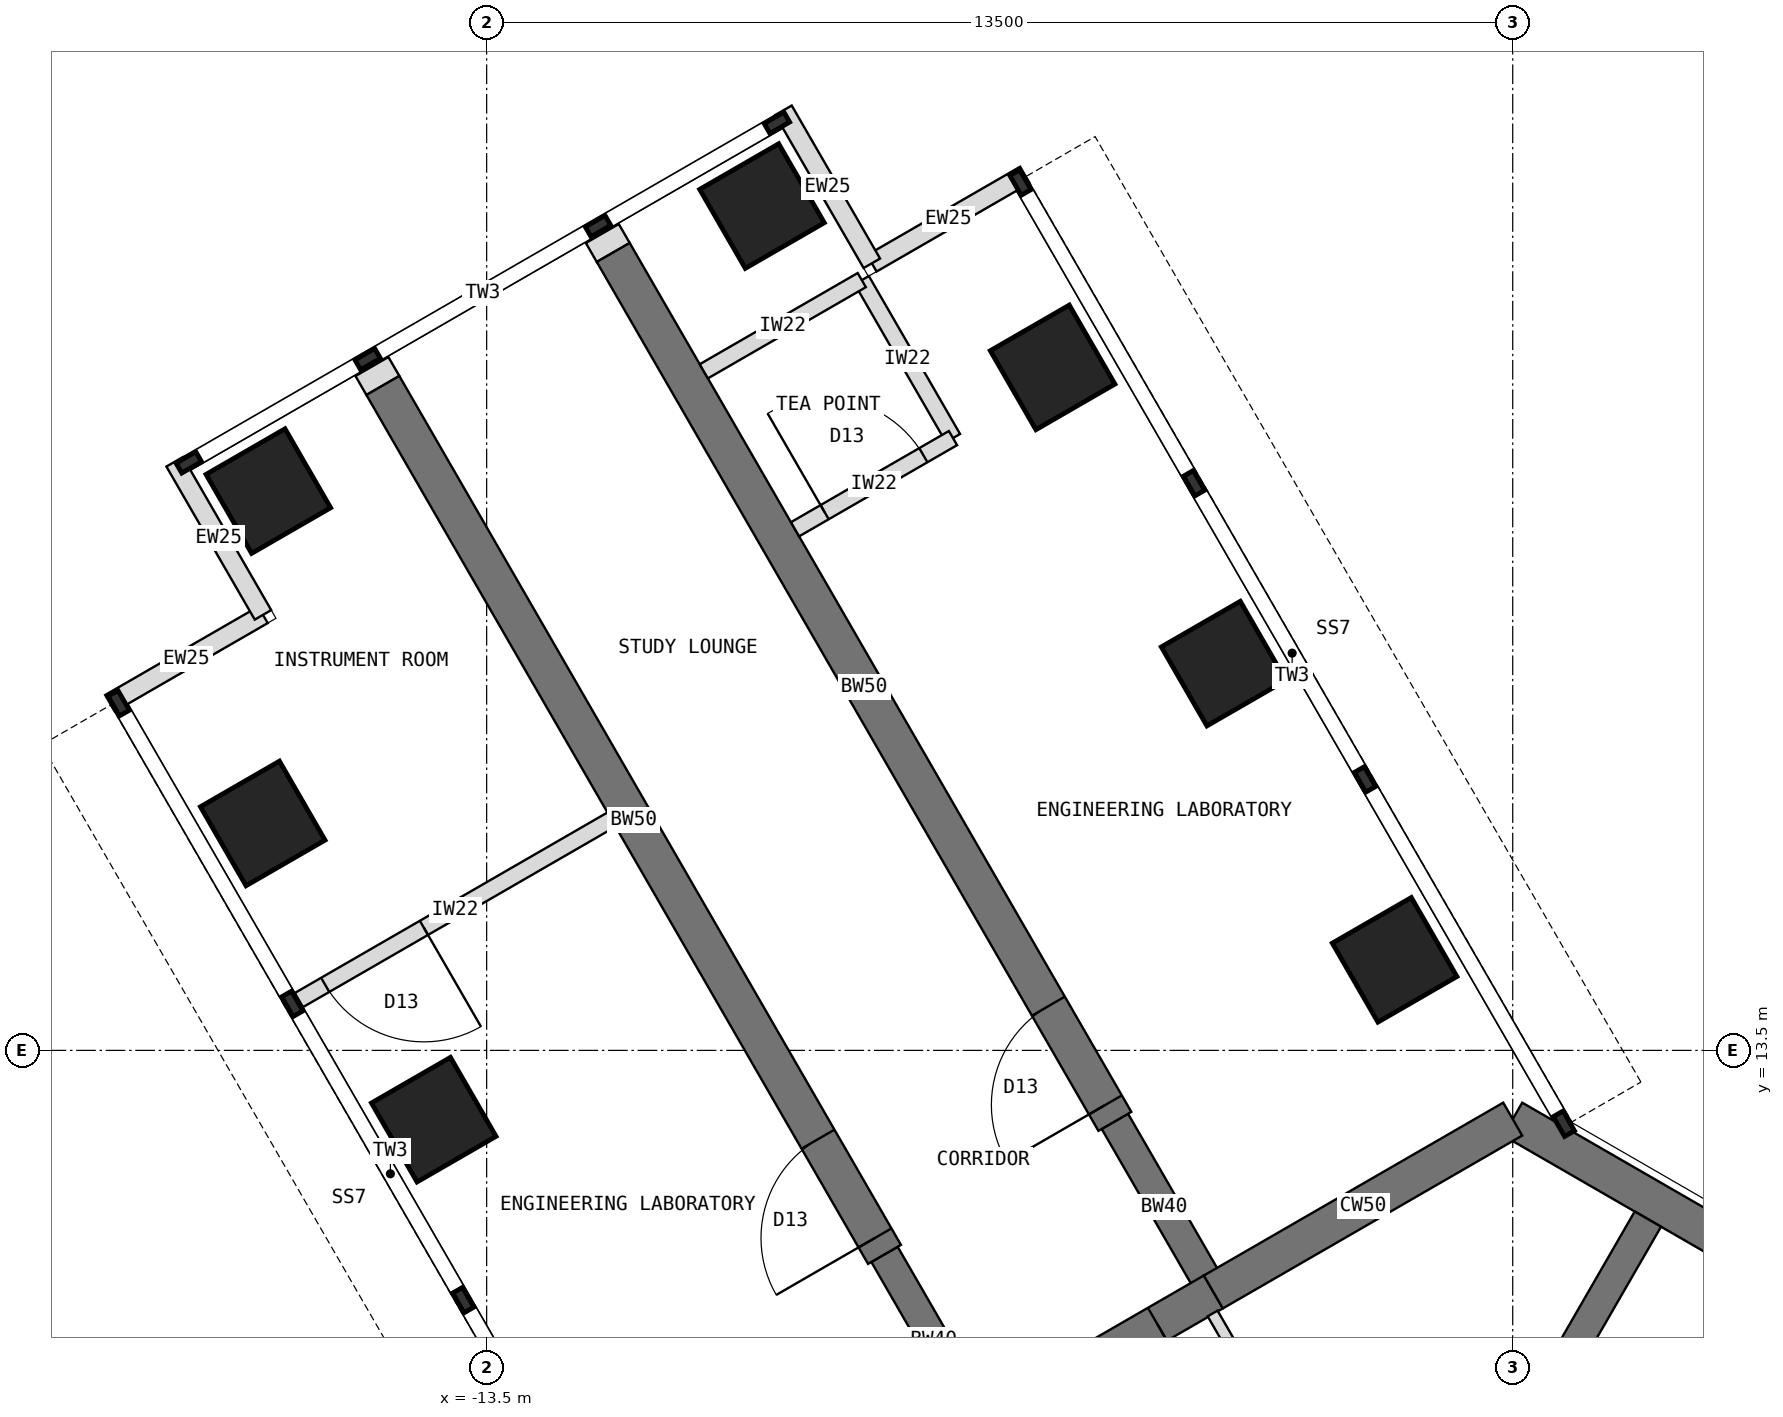
"""IFC4 building model, lengths in metres.
Left out: names, types, materials, properties, quantities, classifications, styles, units other than length and angle.
Written with IfcOpenShell. Run it as: python <this file> out.ifc"""

import sys

from ifc_helpers import new_model, si_unit, direction, frame, frame_2d, origin, origin_2d, place, context, subcontext, project, spatial, rectangle, extrude, element, fill, save


model = new_model("IFC4")
c1 = context("Model", 3, precision=1e-05, world=origin(), true_north=direction((0.0, 1.0)))
c2 = subcontext(c1, "Body", "Model", "MODEL_VIEW")
j1 = project(units=[si_unit("LENGTHUNIT", "METRE"), si_unit("PLANEANGLEUNIT", "RADIAN")], contexts=[c1])
p1 = place(None, origin())
s1 = spatial("IfcSite", under=j1, at=p1, CompositionType="ELEMENT")
p2 = place(p1, origin())
s2 = spatial("IfcBuilding", under=s1, at=p2, CompositionType="ELEMENT")
p3 = place(p2, frame((0.0, 0.0, 174.5)))
s3 = spatial("IfcBuildingStorey", under=s2, at=p3, CompositionType="ELEMENT", Elevation=174.5)
p4 = place(p3, frame((10.908, 6.298, 0.0), z_axis=(0.0, 0.0, 1.0), x_axis=(-0.866021940709, 0.500005998175, 0.0)))
e1 = element("IfcWall", 1, at=p4, inside=s3, PredefinedType="SHEAR", context=c2, shape_type="SweptSolid", body=[
    extrude(rectangle(XDim=12.596, YDim=0.5, at=frame_2d((6.298, 0.0))), origin(), (0.0, 0.0, 1.0), 4.0),
])
p5 = place(p3, frame((0.0, 12.596, 0.0), z_axis=(0.0, 0.0, 1.0), x_axis=(-0.866011268655, -0.500024481964, 0.0)))
e2 = element("IfcWall", 2, at=p5, inside=s3, PredefinedType="SHEAR", context=c2, shape_type="SweptSolid", body=[
    extrude(rectangle(XDim=4.548, YDim=0.5, at=frame_2d((2.274, 0.0))), origin(), (0.0, 0.0, 1.0), 4.0),
])
p6 = place(p3, frame((-3.939, 10.322, 0.0), z_axis=(0.0, 0.0, 1.0), x_axis=(-0.866019471182, -0.500010275428, 0.0)))
e3 = element("IfcWall", 3, at=p6, inside=s3, PredefinedType="SHEAR", context=c2, shape_type="SweptSolid", body=[
    extrude(rectangle(XDim=3.5, YDim=0.5, at=frame_2d((1.75, 0.0))), origin(), (0.0, 0.0, 1.0), 4.0),
])
p7 = place(p6, frame((0.85, 0.0, 0.0)))
e4 = element("IfcOpeningElement", 4, at=p7, cuts=e3, PredefinedType="OPENING", context=c2, shape_type="SweptSolid", body=[
    extrude(rectangle(XDim=1.8, YDim=2.1, at=frame_2d((0.9, 1.05))), frame((0.0, 0.26, 0.0), z_axis=(0.0, -1.0, 0.0), x_axis=(1.0, 0.0, 0.0)), (0.0, 0.0, 1.0), 0.52),
])
p8 = place(p3, frame((-6.97, 8.572, 0.0), z_axis=(0.0, 0.0, 1.0), x_axis=(-0.499988811324, 0.866031863473, 0.0)))
e5 = element("IfcWall", 5, at=p8, inside=s3, PredefinedType="SHEAR", context=c2, shape_type="SweptSolid", body=[
    extrude(rectangle(XDim=2.592, YDim=0.4, at=frame_2d((1.296, 0.0))), origin(), (0.0, 0.0, 1.0), 4.0),
])
p9 = place(p3, frame((-8.266, 10.816, 0.0), z_axis=(0.0, 0.0, 1.0), x_axis=(-0.499996231654, 0.866027579429, 0.0)))
e6 = element("IfcWall", 6, at=p9, inside=s3, PredefinedType="SHEAR", context=c2, shape_type="SweptSolid", body=[
    extrude(rectangle(XDim=13.2, YDim=0.5, at=frame_2d((6.6, 0.0))), origin(), (0.0, 0.0, 1.0), 4.0),
])
p10 = place(p9, frame((0.25, 0.0, 0.0)))
e7 = element("IfcOpeningElement", 7, at=p10, cuts=e6, PredefinedType="OPENING", context=c2, shape_type="SweptSolid", body=[
    extrude(rectangle(XDim=1.5, YDim=2.1, at=frame_2d((0.75, 1.05))), frame((0.0, 0.26, 0.0), z_axis=(0.0, -1.0, 0.0), x_axis=(1.0, 0.0, 0.0)), (0.0, 0.0, 1.0), 0.52),
])
p11 = place(p3, frame((-3.939, 10.322, 0.0), z_axis=(0.0, 0.0, 1.0), x_axis=(-0.499918158782, 0.866072649678, 0.0)))
e8 = element("IfcWall", 8, at=p11, inside=s3, PredefinedType="SHEAR", context=c2, shape_type="SweptSolid", body=[
    extrude(rectangle(XDim=2.592, YDim=0.4, at=frame_2d((1.296, 0.0))), origin(), (0.0, 0.0, 1.0), 4.0),
])
p12 = place(p3, frame((-5.234, 12.566, 0.0), z_axis=(0.0, 0.0, 1.0), x_axis=(-0.500010103361, 0.866019570528, 0.0)))
e9 = element("IfcWall", 9, at=p12, inside=s3, PredefinedType="SHEAR", context=c2, shape_type="SweptSolid", body=[
    extrude(rectangle(XDim=13.2, YDim=0.5, at=frame_2d((6.6, 0.0))), origin(), (0.0, 0.0, 1.0), 4.0),
])
p13 = place(p12, frame((0.25, 0.0, 0.0)))
e10 = element("IfcOpeningElement", 10, at=p13, cuts=e9, PredefinedType="OPENING", context=c2, shape_type="SweptSolid", body=[
    extrude(rectangle(XDim=1.5, YDim=2.1, at=frame_2d((0.75, 1.05))), frame((0.0, 0.26, 0.0), z_axis=(0.0, -1.0, 0.0), x_axis=(1.0, 0.0, 0.0)), (0.0, 0.0, 1.0), 0.52),
])
for number, where, z_axis, x_axis in (
    (11, (-1.554, 14.691, 0.0), (0.0, 0.0, 1.0), (0.866, 0.5, 0.0)),
    (12, (-14.196, 12.588, 0.0), (0.0, 0.0, 1.0), (0.866, 0.5, 0.0)),
    (13, (-3.804, 18.588, 0.0), (0.0, 0.0, 1.0), (0.866, 0.5, 0.0)),
    (14, (-16.446, 16.486, 0.0), (0.0, 0.0, 1.0), (0.866, 0.5, 0.0)),
    (15, (-6.054, 22.486, 0.0), (0.0, 0.0, 1.0), (0.866, 0.5, 0.0)),
    (16, (-16.373, 20.858, 0.0), (0.0, 0.0, 1.0), (0.866, 0.5, 0.0)),
    (17, (-9.877, 24.608, 0.0), (0.0, 0.0, 1.0), (0.866, 0.5, 0.0)),
):
    element("IfcColumn", number, at=place(p3, frame(where, z_axis=z_axis, x_axis=x_axis)), inside=s3, PredefinedType="COLUMN", context=c2, shape_type="SweptSolid", body=[
        extrude(rectangle(XDim=1.2, YDim=1.2, at=origin_2d()), origin(), (0.0, 0.0, 1.0), 4.0),
    ])
for number, where, z_axis, x_axis in (
    (18, (-18.456, 18.067, 0.0), (0.0, 0.0, 1.0), (0.866, 0.5, 0.0)),
    (19, (-16.443, 19.23, 0.0), (0.0, 0.0, 1.0), (-0.5, 0.866, 0.0)),
    (20, (-6.419, 25.017, 0.0), (0.0, 0.0, 1.0), (-0.866, -0.5, 0.0)),
    (21, (-8.432, 23.855, 0.0), (0.0, 0.0, 1.0), (-0.5, 0.866, 0.0)),
):
    element("IfcWall", number, at=place(p3, frame(where, z_axis=z_axis, x_axis=x_axis)), inside=s3, PredefinedType="STANDARD", context=c2, shape_type="SweptSolid", body=[
        extrude(rectangle(XDim=2.325, YDim=0.25, at=frame_2d((1.163, 0.0))), origin(), (0.0, 0.0, 1.0), 3.8),
    ])
for number, where, z_axis, x_axis in (
    (22, (-14.865, 22.248, 0.0), (0.0, 0.0, 1.0), (-0.5, 0.866, 0.0)),
    (23, (-11.834, 23.998, 0.0), (0.0, 0.0, 1.0), (-0.5, 0.866, 0.0)),
):
    element("IfcWall", number, at=place(p3, frame(where, z_axis=z_axis, x_axis=x_axis)), inside=s3, PredefinedType="PARTITIONING", context=c2, shape_type="SweptSolid", body=[
        extrude(rectangle(XDim=0.288, YDim=0.5, at=frame_2d((0.144, 0.0))), origin(), (0.0, 0.0, 1.0), 3.8),
    ])
p14 = place(p3, frame((-1.201, 6.12, 0.0), z_axis=(0.0, 0.0, 1.0), x_axis=(0.500021575205, 0.866012946976, 0.0)))
e24 = element("IfcWall", 24, at=p14, inside=s3, PredefinedType="SHEAR", context=c2, shape_type="SweptSolid", body=[
    extrude(rectangle(XDim=5.958, YDim=0.4, at=frame_2d((2.979, 0.0))), origin(), (0.0, 0.0, 1.0), 4.0),
])
p15 = place(p3, frame((-11.857, 16.537, 0.0), z_axis=(0.0, 0.0, 1.0), x_axis=(-0.866033238375, -0.499986429846, 0.0)))
e25 = element("IfcWall", 25, at=p15, inside=s3, PredefinedType="PARTITIONING", context=c2, shape_type="SweptSolid", body=[
    extrude(rectangle(XDim=4.75, YDim=0.215, at=frame_2d((2.375, 0.0))), origin(), (0.0, 0.0, 1.0), 3.8),
])
p16 = place(p15, frame((2.85, 0.0, 0.0)))
e26 = element("IfcOpeningElement", 26, at=p16, cuts=e25, PredefinedType="OPENING", context=c2, shape_type="SweptSolid", body=[
    extrude(rectangle(XDim=1.5, YDim=2.1, at=frame_2d((0.75, 1.05))), frame((0.0, 0.117, 0.0), z_axis=(0.0, -1.0, 0.0), x_axis=(1.0, 0.0, 0.0)), (0.0, 0.0, 1.0), 0.235),
])
p17 = place(p3, frame((-7.365, 21.556, 0.0), z_axis=(0.0, 0.0, 1.0), x_axis=(-0.500001309137, 0.866024647952, 0.0)))
e27 = element("IfcWall", 27, at=p17, inside=s3, PredefinedType="PARTITIONING", context=c2, shape_type="SweptSolid", body=[
    extrude(rectangle(XDim=2.4, YDim=0.215, at=frame_2d((1.2, 0.0))), origin(), (0.0, 0.0, 1.0), 3.8),
])
p18 = place(p3, frame((-9.443, 20.356, 0.0), z_axis=(0.0, 0.0, 1.0), x_axis=(0.866024647952, 0.500001309137, 0.0)))
e28 = element("IfcWall", 28, at=p18, inside=s3, PredefinedType="PARTITIONING", context=c2, shape_type="SweptSolid", body=[
    extrude(rectangle(XDim=2.4, YDim=0.215, at=frame_2d((1.2, 0.0))), origin(), (0.0, 0.0, 1.0), 3.8),
])
p19 = place(p18, frame((0.45, 0.0, 0.0)))
e29 = element("IfcOpeningElement", 29, at=p19, cuts=e28, PredefinedType="OPENING", context=c2, shape_type="SweptSolid", body=[
    extrude(rectangle(XDim=1.5, YDim=2.1, at=frame_2d((0.75, 1.05))), frame((0.0, 0.117, 0.0), z_axis=(0.0, -1.0, 0.0), x_axis=(1.0, 0.0, 0.0)), (0.0, 0.0, 1.0), 0.235),
])
p20 = place(p3, frame((-10.643, 22.434, 0.0), z_axis=(0.0, 0.0, 1.0), x_axis=(0.866050077142, 0.499957262057, 0.0)))
e30 = element("IfcWall", 30, at=p20, inside=s3, PredefinedType="PARTITIONING", context=c2, shape_type="SweptSolid", body=[
    extrude(rectangle(XDim=2.4, YDim=0.215, at=frame_2d((1.2, 0.0))), origin(), (0.0, 0.0, 1.0), 3.8),
])
p21 = place(p3, frame((-3.948, 10.039, 0.0), z_axis=(0.0, 0.0, 1.0), x_axis=(0.500001558674, -0.866024503882, 0.0)))
e31 = element("IfcWall", 31, at=p21, inside=s3, PredefinedType="PARTITIONING", context=c2, shape_type="SweptSolid", body=[
    extrude(rectangle(XDim=4.568, YDim=0.15, at=frame_2d((2.284, 0.0))), origin(), (0.0, 0.0, 1.0), 3.8),
])
p22 = place(p21, frame((1.774, 0.0, 0.0)))
e32 = element("IfcOpeningElement", 32, at=p22, cuts=e31, PredefinedType="OPENING", context=c2, shape_type="SweptSolid", body=[
    extrude(rectangle(XDim=1.0, YDim=2.1, at=frame_2d((0.5, 1.05))), frame((0.0, 0.085, 0.0), z_axis=(0.0, -1.0, 0.0), x_axis=(1.0, 0.0, 0.0)), (0.0, 0.0, 1.0), 0.17),
])
p23 = place(p7, origin())
e33 = element("IfcDoor", 33, at=p23, inside=s3, OperationType="DOUBLE_DOOR_DOUBLE_SWING", PredefinedType="DOOR", context=c2, shape_type="SweptSolid", body=[
    extrude(rectangle(XDim=1.8, YDim=2.1, at=frame_2d((0.9, 1.05))), frame((0.0, 0.025, 0.0), z_axis=(0.0, -1.0, 0.0), x_axis=(1.0, 0.0, 0.0)), (0.0, 0.0, 1.0), 0.05),
])
fill(e4, e33)
p24 = place(p16, origin())
e34 = element("IfcDoor", 34, at=p24, inside=s3, OperationType="DOUBLE_DOOR_SINGLE_SWING", PredefinedType="DOOR", context=c2, shape_type="SweptSolid", body=[
    extrude(rectangle(XDim=1.5, YDim=2.1, at=frame_2d((0.75, 1.05))), frame((0.0, 0.025, 0.0), z_axis=(0.0, -1.0, 0.0), x_axis=(1.0, 0.0, 0.0)), (0.0, 0.0, 1.0), 0.05),
])
fill(e26, e34)
p25 = place(p19, origin())
e35 = element("IfcDoor", 35, at=p25, inside=s3, OperationType="DOUBLE_DOOR_SINGLE_SWING", PredefinedType="DOOR", context=c2, shape_type="SweptSolid", body=[
    extrude(rectangle(XDim=1.5, YDim=2.1, at=frame_2d((0.75, 1.05))), frame((0.0, 0.025, 0.0), z_axis=(0.0, -1.0, 0.0), x_axis=(1.0, 0.0, 0.0)), (0.0, 0.0, 1.0), 0.05),
])
fill(e29, e35)
p26 = place(p10, origin())
e36 = element("IfcDoor", 36, at=p26, inside=s3, OperationType="DOUBLE_DOOR_SINGLE_SWING", PredefinedType="DOOR", context=c2, shape_type="SweptSolid", body=[
    extrude(rectangle(XDim=1.5, YDim=2.1, at=frame_2d((0.75, 1.05))), frame((0.0, 0.025, 0.0), z_axis=(0.0, -1.0, 0.0), x_axis=(1.0, 0.0, 0.0)), (0.0, 0.0, 1.0), 0.05),
])
fill(e7, e36)
p27 = place(p13, origin())
e37 = element("IfcDoor", 37, at=p27, inside=s3, OperationType="DOUBLE_DOOR_SINGLE_SWING", PredefinedType="DOOR", context=c2, shape_type="SweptSolid", body=[
    extrude(rectangle(XDim=1.5, YDim=2.1, at=frame_2d((0.75, 1.05))), frame((0.0, 0.025, 0.0), z_axis=(0.0, -1.0, 0.0), x_axis=(1.0, 0.0, 0.0)), (0.0, 0.0, 1.0), 0.05),
])
fill(e10, e37)
save(model, sys.argv[1])
